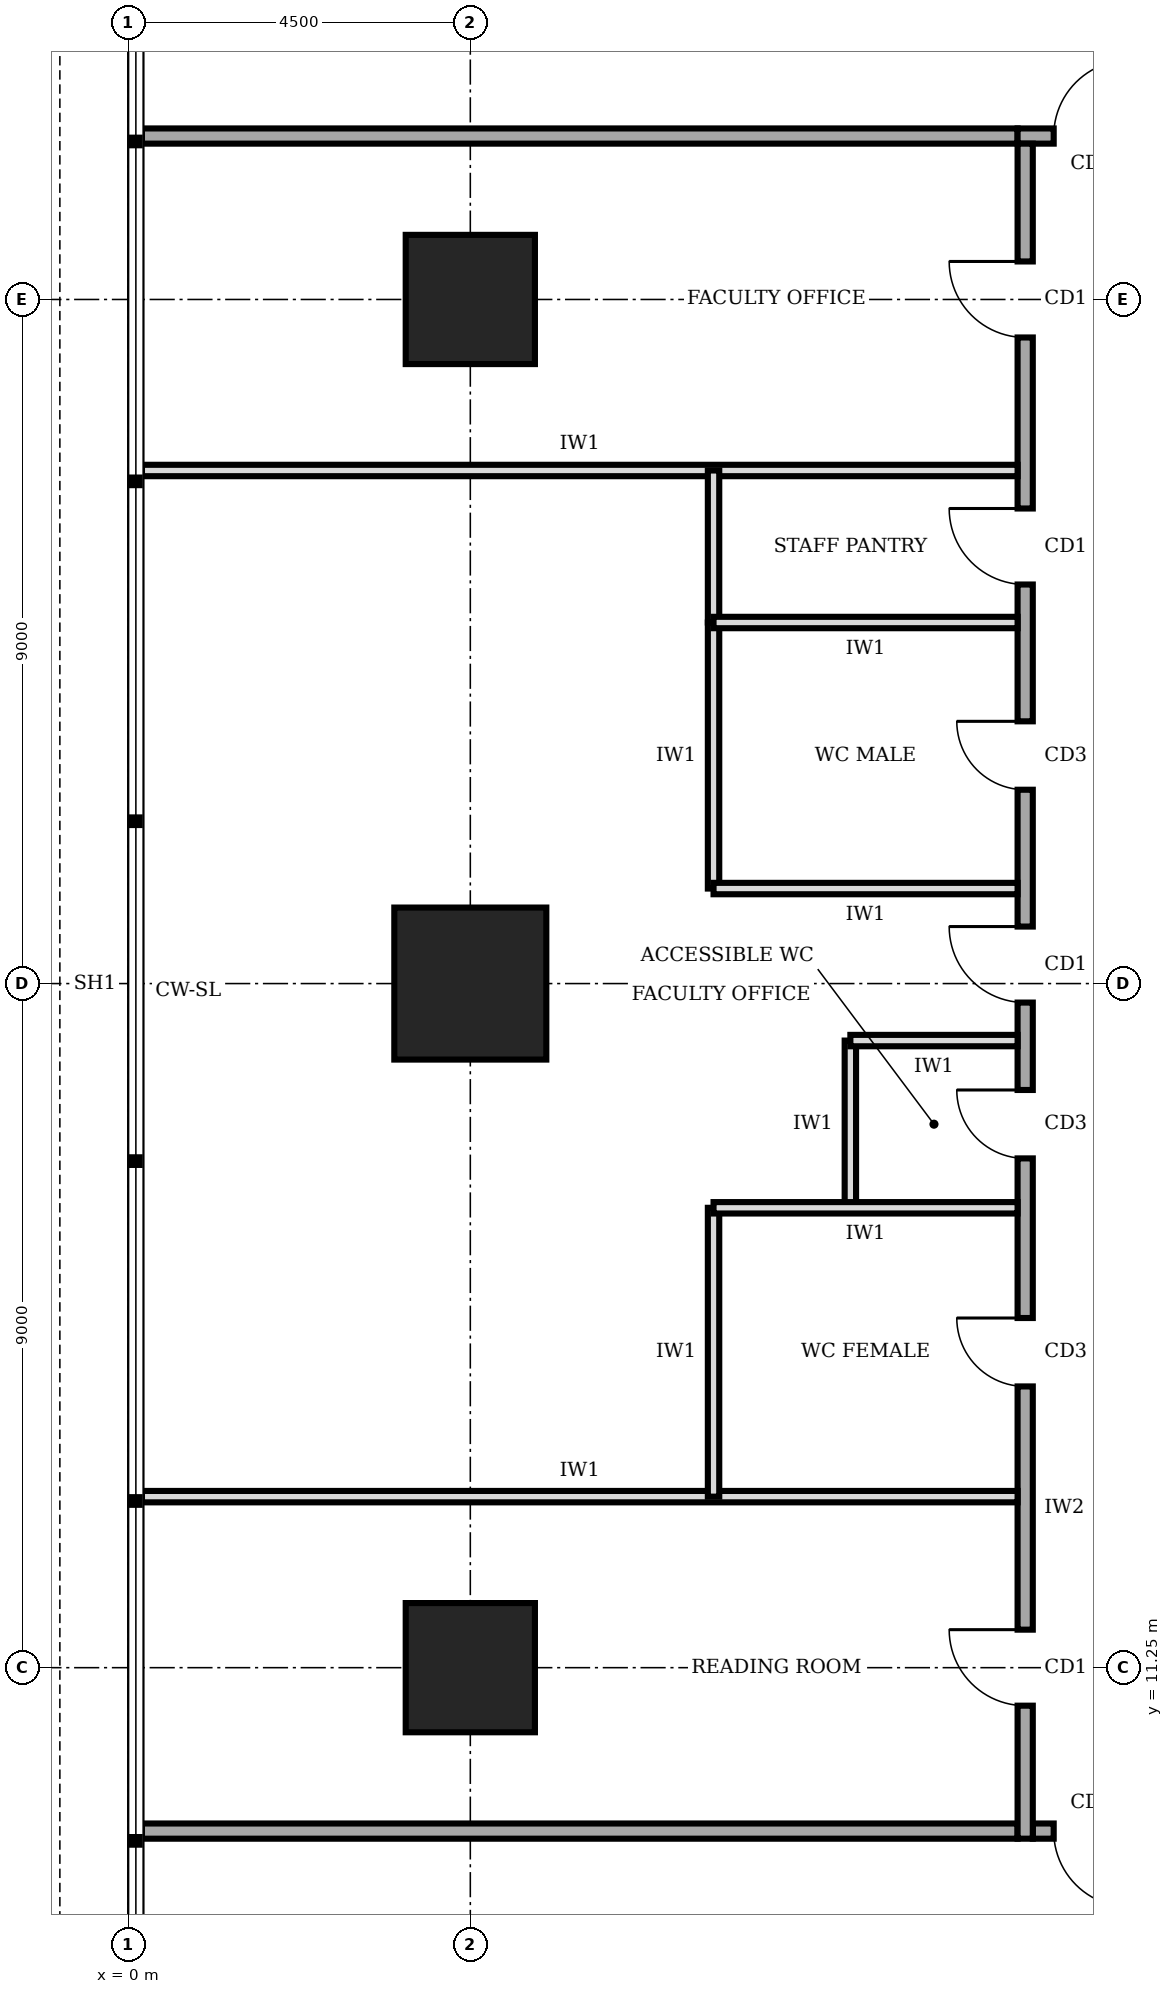
"""IFC4 building model, lengths in metres.
Left out: names, types, materials, properties, quantities, classifications, styles, units other than length and angle.
Written with IfcOpenShell. Run it as: python <this file> out.ifc"""

import sys

from ifc_helpers import new_model, si_unit, direction, frame, frame_2d, origin, origin_2d, place, context, subcontext, project, spatial, rectangle, extrude, element, fill, save


model = new_model("IFC4")
c1 = context("Model", 3, precision=1e-05, world=origin(), true_north=direction((0.0, 1.0)))
c2 = subcontext(c1, "Body", "Model", "MODEL_VIEW")
j1 = project(units=[si_unit("LENGTHUNIT", "METRE"), si_unit("PLANEANGLEUNIT", "RADIAN")], contexts=[c1])
p1 = place(None, origin())
s1 = spatial("IfcSite", under=j1, at=p1, CompositionType="ELEMENT")
p2 = place(p1, origin())
s2 = spatial("IfcBuilding", under=s1, at=p2, CompositionType="ELEMENT")
p3 = place(p2, frame((0.0, 0.0, 293.0)))
s3 = spatial("IfcBuildingStorey", under=s2, at=p3, CompositionType="ELEMENT", Elevation=293.0)
p4 = place(p3, frame((4.5, 11.25, 0.0), z_axis=(0.0, 0.0, 1.0), x_axis=(1.0, 0.0, 0.0)))
e1 = element("IfcColumn", 1, at=p4, inside=s3, PredefinedType="COLUMN", context=c2, shape_type="SweptSolid", body=[
    extrude(rectangle(XDim=1.7, YDim=1.7, at=origin_2d()), origin(), (0.0, 0.0, 1.0), 4.0),
])
p5 = place(p3, frame((4.5, 20.25, 0.0), z_axis=(0.0, 0.0, 1.0), x_axis=(1.0, 0.0, 0.0)))
e2 = element("IfcColumn", 2, at=p5, inside=s3, PredefinedType="COLUMN", context=c2, shape_type="SweptSolid", body=[
    extrude(rectangle(XDim=2.0, YDim=2.0, at=origin_2d()), origin(), (0.0, 0.0, 1.0), 4.0),
])
p6 = place(p3, frame((4.5, 29.25, 0.0), z_axis=(0.0, 0.0, 1.0), x_axis=(1.0, 0.0, 0.0)))
e3 = element("IfcColumn", 3, at=p6, inside=s3, PredefinedType="COLUMN", context=c2, shape_type="SweptSolid", body=[
    extrude(rectangle(XDim=1.7, YDim=1.7, at=origin_2d()), origin(), (0.0, 0.0, 1.0), 4.0),
])
p7 = place(p3, frame((11.9, 9.1, 0.0), z_axis=(0.0, 0.0, 1.0), x_axis=(1.0, 0.0, 0.0)))
e4 = element("IfcWall", 4, at=p7, inside=s3, PredefinedType="SOLIDWALL", context=c2, shape_type="SweptSolid", body=[
    extrude(rectangle(XDim=16.9, YDim=0.2, at=frame_2d((8.45, 0.0))), origin(), (0.0, 0.0, 1.0), 3.75),
])
p8 = place(p7, frame((0.275, 0.0, 0.0)))
e5 = element("IfcOpeningElement", 5, at=p8, cuts=e4, PredefinedType="OPENING", context=c2, shape_type="SweptSolid", body=[
    extrude(rectangle(XDim=1.0, YDim=2.1, at=frame_2d((0.5, 1.05))), frame((0.0, 0.11, 0.0), z_axis=(0.0, -1.0, 0.0), x_axis=(1.0, 0.0, 0.0)), (0.0, 0.0, 1.0), 0.22),
])
p9 = place(p7, frame((7.45, 0.0, 0.0)))
e6 = element("IfcOpeningElement", 6, at=p9, cuts=e4, PredefinedType="OPENING", context=c2, shape_type="SweptSolid", body=[
    extrude(rectangle(XDim=1.8, YDim=2.1, at=frame_2d((0.9, 1.05))), frame((0.0, 0.11, 0.0), z_axis=(0.0, -1.0, 0.0), x_axis=(1.0, 0.0, 0.0)), (0.0, 0.0, 1.0), 0.22),
])
p10 = place(p7, frame((15.425, 0.0, 0.0)))
e7 = element("IfcOpeningElement", 7, at=p10, cuts=e4, PredefinedType="OPENING", context=c2, shape_type="SweptSolid", body=[
    extrude(rectangle(XDim=1.0, YDim=2.1, at=frame_2d((0.5, 1.05))), frame((0.0, 0.11, 0.0), z_axis=(0.0, -1.0, 0.0), x_axis=(1.0, 0.0, 0.0)), (0.0, 0.0, 1.0), 0.22),
])
p11 = place(p3, frame((28.6, 31.4, 0.0), z_axis=(0.0, 0.0, 1.0), x_axis=(-1.0, 0.0, 0.0)))
e8 = element("IfcWall", 8, at=p11, inside=s3, PredefinedType="SOLIDWALL", context=c2, shape_type="SweptSolid", body=[
    extrude(rectangle(XDim=16.9, YDim=0.2, at=frame_2d((8.45, 0.0))), origin(), (0.0, 0.0, 1.0), 3.75),
])
p12 = place(p11, frame((15.425, 0.0, 0.0)))
e9 = element("IfcOpeningElement", 9, at=p12, cuts=e8, PredefinedType="OPENING", context=c2, shape_type="SweptSolid", body=[
    extrude(rectangle(XDim=1.0, YDim=2.1, at=frame_2d((0.5, 1.05))), frame((0.0, 0.11, 0.0), z_axis=(0.0, -1.0, 0.0), x_axis=(1.0, 0.0, 0.0)), (0.0, 0.0, 1.0), 0.22),
])
p13 = place(p11, frame((7.45, 0.0, 0.0)))
e10 = element("IfcOpeningElement", 10, at=p13, cuts=e8, PredefinedType="OPENING", context=c2, shape_type="SweptSolid", body=[
    extrude(rectangle(XDim=1.8, YDim=2.1, at=frame_2d((0.9, 1.05))), frame((0.0, 0.11, 0.0), z_axis=(0.0, -1.0, 0.0), x_axis=(1.0, 0.0, 0.0)), (0.0, 0.0, 1.0), 0.22),
])
p14 = place(p11, frame((0.275, 0.0, 0.0)))
e11 = element("IfcOpeningElement", 11, at=p14, cuts=e8, PredefinedType="OPENING", context=c2, shape_type="SweptSolid", body=[
    extrude(rectangle(XDim=1.0, YDim=2.1, at=frame_2d((0.5, 1.05))), frame((0.0, 0.11, 0.0), z_axis=(0.0, -1.0, 0.0), x_axis=(1.0, 0.0, 0.0)), (0.0, 0.0, 1.0), 0.22),
])
p15 = place(p3, frame((11.8, 31.3, 0.0), z_axis=(0.0, 0.0, 1.0), x_axis=(0.0, -1.0, 0.0)))
e12 = element("IfcWall", 12, at=p15, inside=s3, PredefinedType="SOLIDWALL", context=c2, shape_type="SweptSolid", body=[
    extrude(rectangle(XDim=22.3, YDim=0.2, at=frame_2d((11.15, 0.0))), origin(), (0.0, 0.0, 1.0), 3.75),
])
p16 = place(p15, frame((19.55, 0.0, 0.0)))
e13 = element("IfcOpeningElement", 13, at=p16, cuts=e12, PredefinedType="OPENING", context=c2, shape_type="SweptSolid", body=[
    extrude(rectangle(XDim=1.0, YDim=2.1, at=frame_2d((0.5, 1.05))), frame((0.0, 0.11, 0.0), z_axis=(0.0, -1.0, 0.0), x_axis=(1.0, 0.0, 0.0)), (0.0, 0.0, 1.0), 0.22),
])
p17 = place(p15, frame((15.45, 0.0, 0.0)))
e14 = element("IfcOpeningElement", 14, at=p17, cuts=e12, PredefinedType="OPENING", context=c2, shape_type="SweptSolid", body=[
    extrude(rectangle(XDim=0.9, YDim=2.1, at=frame_2d((0.45, 1.05))), frame((0.0, 0.11, 0.0), z_axis=(0.0, -1.0, 0.0), x_axis=(1.0, 0.0, 0.0)), (0.0, 0.0, 1.0), 0.22),
])
p18 = place(p15, frame((12.45, 0.0, 0.0)))
e15 = element("IfcOpeningElement", 15, at=p18, cuts=e12, PredefinedType="OPENING", context=c2, shape_type="SweptSolid", body=[
    extrude(rectangle(XDim=0.9, YDim=2.1, at=frame_2d((0.45, 1.05))), frame((0.0, 0.11, 0.0), z_axis=(0.0, -1.0, 0.0), x_axis=(1.0, 0.0, 0.0)), (0.0, 0.0, 1.0), 0.22),
])
p19 = place(p15, frame((7.6, 0.0, 0.0)))
e16 = element("IfcOpeningElement", 16, at=p19, cuts=e12, PredefinedType="OPENING", context=c2, shape_type="SweptSolid", body=[
    extrude(rectangle(XDim=0.9, YDim=2.1, at=frame_2d((0.45, 1.05))), frame((0.0, 0.11, 0.0), z_axis=(0.0, -1.0, 0.0), x_axis=(1.0, 0.0, 0.0)), (0.0, 0.0, 1.0), 0.22),
])
p20 = place(p15, frame((4.8, 0.0, 0.0)))
e17 = element("IfcOpeningElement", 17, at=p20, cuts=e12, PredefinedType="OPENING", context=c2, shape_type="SweptSolid", body=[
    extrude(rectangle(XDim=1.0, YDim=2.1, at=frame_2d((0.5, 1.05))), frame((0.0, 0.11, 0.0), z_axis=(0.0, -1.0, 0.0), x_axis=(1.0, 0.0, 0.0)), (0.0, 0.0, 1.0), 0.22),
])
p21 = place(p15, frame((10.3, 0.0, 0.0)))
e18 = element("IfcOpeningElement", 18, at=p21, cuts=e12, PredefinedType="OPENING", context=c2, shape_type="SweptSolid", body=[
    extrude(rectangle(XDim=1.0, YDim=2.1, at=frame_2d((0.5, 1.05))), frame((0.0, 0.11, 0.0), z_axis=(0.0, -1.0, 0.0), x_axis=(1.0, 0.0, 0.0)), (0.0, 0.0, 1.0), 0.22),
])
p22 = place(p15, frame((1.55, 0.0, 0.0)))
e19 = element("IfcOpeningElement", 19, at=p22, cuts=e12, PredefinedType="OPENING", context=c2, shape_type="SweptSolid", body=[
    extrude(rectangle(XDim=1.0, YDim=2.1, at=frame_2d((0.5, 1.05))), frame((0.0, 0.11, 0.0), z_axis=(0.0, -1.0, 0.0), x_axis=(1.0, 0.0, 0.0)), (0.0, 0.0, 1.0), 0.22),
])
for number, where, z_axis, x_axis in (
    (20, (0.18, 9.1, 0.0), (0.0, 0.0, 1.0), (1.0, 0.0, 0.0)),
    (21, (0.18, 31.4, 0.0), (0.0, 0.0, 1.0), (1.0, 0.0, 0.0)),
):
    element("IfcWall", number, at=place(p3, frame(where, z_axis=z_axis, x_axis=x_axis)), inside=s3, PredefinedType="SOLIDWALL", context=c2, shape_type="SweptSolid", body=[
        extrude(rectangle(XDim=11.52, YDim=0.2, at=frame_2d((5.76, 0.0))), origin(), (0.0, 0.0, 1.0), 3.75),
    ])
for number, where, z_axis, x_axis in (
    (22, (0.18, 13.5, 0.0), (0.0, 0.0, 1.0), (1.0, 0.0, 0.0)),
    (23, (0.18, 27.0, 0.0), (0.0, 0.0, 1.0), (1.0, 0.0, 0.0)),
):
    element("IfcWall", number, at=place(p3, frame(where, z_axis=z_axis, x_axis=x_axis)), inside=s3, PredefinedType="PARTITIONING", context=c2, shape_type="SweptSolid", body=[
        extrude(rectangle(XDim=11.52, YDim=0.15, at=frame_2d((5.76, 0.0))), origin(), (0.0, 0.0, 1.0), 3.75),
    ])
p23 = place(p3, frame((11.7, 17.3, 0.0), z_axis=(0.0, 0.0, 1.0), x_axis=(-1.0, 0.0, 0.0)))
e24 = element("IfcWall", 24, at=p23, inside=s3, PredefinedType="PARTITIONING", context=c2, shape_type="SweptSolid", body=[
    extrude(rectangle(XDim=4.0, YDim=0.15, at=frame_2d((2.0, 0.0))), origin(), (0.0, 0.0, 1.0), 3.75),
])
p24 = place(p3, frame((11.7, 19.5, 0.0), z_axis=(0.0, 0.0, 1.0), x_axis=(-1.0, 0.0, 0.0)))
e25 = element("IfcWall", 25, at=p24, inside=s3, PredefinedType="PARTITIONING", context=c2, shape_type="SweptSolid", body=[
    extrude(rectangle(XDim=2.2, YDim=0.15, at=frame_2d((1.1, 0.0))), origin(), (0.0, 0.0, 1.0), 2.85),
])
for number, where, z_axis, x_axis in (
    (26, (11.7, 21.5, 0.0), (0.0, 0.0, 1.0), (-1.0, 0.0, 0.0)),
    (27, (11.7, 25.0, 0.0), (0.0, 0.0, 1.0), (-1.0, 0.0, 0.0)),
):
    element("IfcWall", number, at=place(p3, frame(where, z_axis=z_axis, x_axis=x_axis)), inside=s3, PredefinedType="PARTITIONING", context=c2, shape_type="SweptSolid", body=[
        extrude(rectangle(XDim=4.0, YDim=0.15, at=frame_2d((2.0, 0.0))), origin(), (0.0, 0.0, 1.0), 3.75),
    ])
p25 = place(p3, frame((7.7, 13.5, 0.0), z_axis=(0.0, 0.0, 1.0), x_axis=(0.0, 1.0, 0.0)))
e28 = element("IfcWall", 28, at=p25, inside=s3, PredefinedType="PARTITIONING", context=c2, shape_type="SweptSolid", body=[
    extrude(rectangle(XDim=3.8, YDim=0.15, at=frame_2d((1.9, 0.0))), origin(), (0.0, 0.0, 1.0), 3.75),
])
p26 = place(p3, frame((9.5, 17.3, 0.0), z_axis=(0.0, 0.0, 1.0), x_axis=(0.0, 1.0, 0.0)))
e29 = element("IfcWall", 29, at=p26, inside=s3, PredefinedType="PARTITIONING", context=c2, shape_type="SweptSolid", body=[
    extrude(rectangle(XDim=2.2, YDim=0.15, at=frame_2d((1.1, 0.0))), origin(), (0.0, 0.0, 1.0), 3.75),
])
p27 = place(p3, frame((7.7, 21.5, 0.0), z_axis=(0.0, 0.0, 1.0), x_axis=(0.0, 1.0, 0.0)))
e30 = element("IfcWall", 30, at=p27, inside=s3, PredefinedType="PARTITIONING", context=c2, shape_type="SweptSolid", body=[
    extrude(rectangle(XDim=3.5, YDim=0.15, at=frame_2d((1.75, 0.0))), origin(), (0.0, 0.0, 1.0), 3.75),
])
p28 = place(p3, frame((7.7, 25.0, 0.0), z_axis=(0.0, 0.0, 1.0), x_axis=(0.0, 1.0, 0.0)))
e31 = element("IfcWall", 31, at=p28, inside=s3, PredefinedType="PARTITIONING", context=c2, shape_type="SweptSolid", body=[
    extrude(rectangle(XDim=2.0, YDim=0.15, at=frame_2d((1.0, 0.0))), origin(), (0.0, 0.0, 1.0), 3.75),
])
p29 = place(p8, frame((1.0, 0.0, 0.0), z_axis=(0.0, 0.0, 1.0), x_axis=(-1.0, 0.0, 0.0)))
e32 = element("IfcDoor", 32, at=p29, inside=s3, OperationType="SINGLE_SWING_LEFT", PredefinedType="DOOR", context=c2, shape_type="SweptSolid", body=[
    extrude(rectangle(XDim=1.0, YDim=2.1, at=frame_2d((0.5, 1.05))), frame((0.0, 0.025, 0.0), z_axis=(0.0, -1.0, 0.0), x_axis=(1.0, 0.0, 0.0)), (0.0, 0.0, 1.0), 0.05),
])
fill(e5, e32)
p30 = place(p12, frame((1.0, 0.0, 0.0), z_axis=(0.0, 0.0, 1.0), x_axis=(-1.0, 0.0, 0.0)))
e33 = element("IfcDoor", 33, at=p30, inside=s3, OperationType="SINGLE_SWING_RIGHT", PredefinedType="DOOR", context=c2, shape_type="SweptSolid", body=[
    extrude(rectangle(XDim=1.0, YDim=2.1, at=frame_2d((0.5, 1.05))), frame((0.0, 0.025, 0.0), z_axis=(0.0, -1.0, 0.0), x_axis=(1.0, 0.0, 0.0)), (0.0, 0.0, 1.0), 0.05),
])
fill(e9, e33)
p31 = place(p16, frame((1.0, 0.0, 0.0), z_axis=(0.0, 0.0, 1.0), x_axis=(-1.0, 0.0, 0.0)))
e34 = element("IfcDoor", 34, at=p31, inside=s3, OperationType="SINGLE_SWING_RIGHT", PredefinedType="DOOR", context=c2, shape_type="SweptSolid", body=[
    extrude(rectangle(XDim=1.0, YDim=2.1, at=frame_2d((0.5, 1.05))), frame((0.0, 0.025, 0.0), z_axis=(0.0, -1.0, 0.0), x_axis=(1.0, 0.0, 0.0)), (0.0, 0.0, 1.0), 0.05),
])
fill(e13, e34)
p32 = place(p17, frame((0.9, 0.0, 0.0), z_axis=(0.0, 0.0, 1.0), x_axis=(-1.0, 0.0, 0.0)))
e35 = element("IfcDoor", 35, at=p32, inside=s3, OperationType="SINGLE_SWING_RIGHT", PredefinedType="DOOR", context=c2, shape_type="SweptSolid", body=[
    extrude(rectangle(XDim=0.9, YDim=2.1, at=frame_2d((0.45, 1.05))), frame((0.0, 0.025, 0.0), z_axis=(0.0, -1.0, 0.0), x_axis=(1.0, 0.0, 0.0)), (0.0, 0.0, 1.0), 0.05),
])
fill(e14, e35)
p33 = place(p18, frame((0.9, 0.0, 0.0), z_axis=(0.0, 0.0, 1.0), x_axis=(-1.0, 0.0, 0.0)))
e36 = element("IfcDoor", 36, at=p33, inside=s3, OperationType="SINGLE_SWING_RIGHT", PredefinedType="DOOR", context=c2, shape_type="SweptSolid", body=[
    extrude(rectangle(XDim=0.9, YDim=2.1, at=frame_2d((0.45, 1.05))), frame((0.0, 0.025, 0.0), z_axis=(0.0, -1.0, 0.0), x_axis=(1.0, 0.0, 0.0)), (0.0, 0.0, 1.0), 0.05),
])
fill(e15, e36)
p34 = place(p19, frame((0.9, 0.0, 0.0), z_axis=(0.0, 0.0, 1.0), x_axis=(-1.0, 0.0, 0.0)))
e37 = element("IfcDoor", 37, at=p34, inside=s3, OperationType="SINGLE_SWING_RIGHT", PredefinedType="DOOR", context=c2, shape_type="SweptSolid", body=[
    extrude(rectangle(XDim=0.9, YDim=2.1, at=frame_2d((0.45, 1.05))), frame((0.0, 0.025, 0.0), z_axis=(0.0, -1.0, 0.0), x_axis=(1.0, 0.0, 0.0)), (0.0, 0.0, 1.0), 0.05),
])
fill(e16, e37)
p35 = place(p20, frame((1.0, 0.0, 0.0), z_axis=(0.0, 0.0, 1.0), x_axis=(-1.0, 0.0, 0.0)))
e38 = element("IfcDoor", 38, at=p35, inside=s3, OperationType="SINGLE_SWING_RIGHT", PredefinedType="DOOR", context=c2, shape_type="SweptSolid", body=[
    extrude(rectangle(XDim=1.0, YDim=2.1, at=frame_2d((0.5, 1.05))), frame((0.0, 0.025, 0.0), z_axis=(0.0, -1.0, 0.0), x_axis=(1.0, 0.0, 0.0)), (0.0, 0.0, 1.0), 0.05),
])
fill(e17, e38)
p36 = place(p21, frame((1.0, 0.0, 0.0), z_axis=(0.0, 0.0, 1.0), x_axis=(-1.0, 0.0, 0.0)))
e39 = element("IfcDoor", 39, at=p36, inside=s3, OperationType="SINGLE_SWING_RIGHT", PredefinedType="DOOR", context=c2, shape_type="SweptSolid", body=[
    extrude(rectangle(XDim=1.0, YDim=2.1, at=frame_2d((0.5, 1.05))), frame((0.0, 0.025, 0.0), z_axis=(0.0, -1.0, 0.0), x_axis=(1.0, 0.0, 0.0)), (0.0, 0.0, 1.0), 0.05),
])
fill(e18, e39)
p37 = place(p22, frame((1.0, 0.0, 0.0), z_axis=(0.0, 0.0, 1.0), x_axis=(-1.0, 0.0, 0.0)))
e40 = element("IfcDoor", 40, at=p37, inside=s3, OperationType="SINGLE_SWING_RIGHT", PredefinedType="DOOR", context=c2, shape_type="SweptSolid", body=[
    extrude(rectangle(XDim=1.0, YDim=2.1, at=frame_2d((0.5, 1.05))), frame((0.0, 0.025, 0.0), z_axis=(0.0, -1.0, 0.0), x_axis=(1.0, 0.0, 0.0)), (0.0, 0.0, 1.0), 0.05),
])
fill(e19, e40)
save(model, sys.argv[1])
